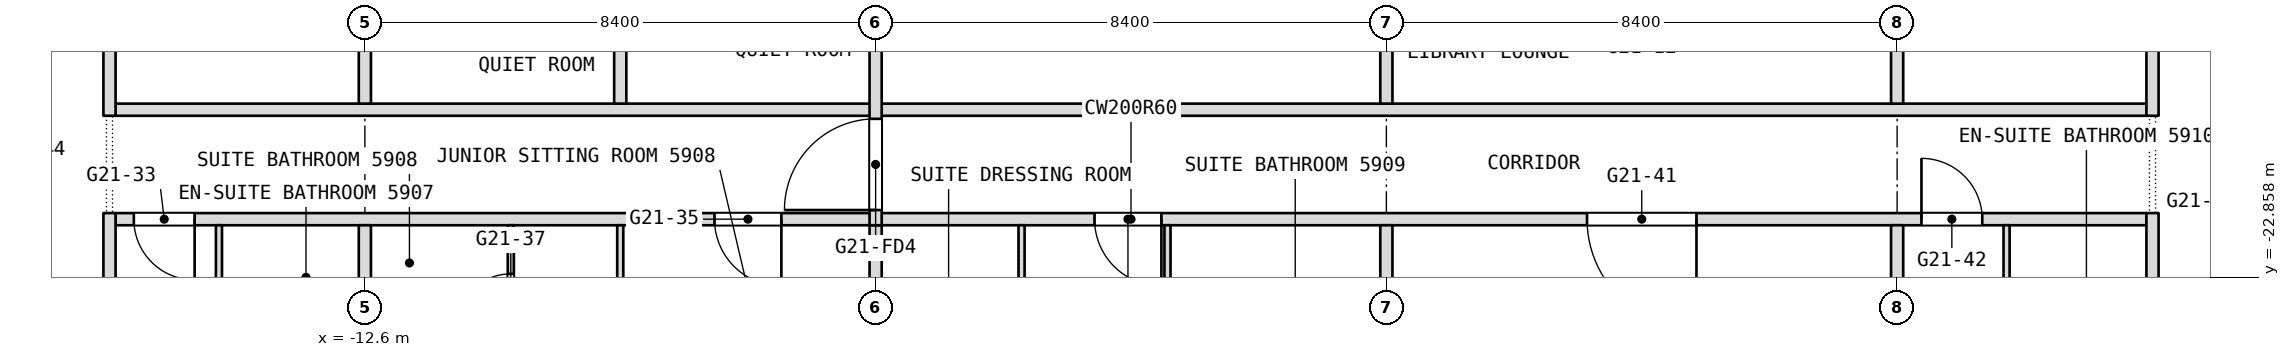
"""IFC4 building model, lengths in metres.
Left out: names, types, materials, properties, quantities, classifications, styles, units other than length and angle.
Written with IfcOpenShell. Run it as: python <this file> out.ifc"""

import sys

from ifc_helpers import new_model, si_unit, direction, frame, frame_2d, origin, place, context, subcontext, project, spatial, rectangle, extrude, element, fill, save


model = new_model("IFC4")
c1 = context("Model", 3, precision=1e-05, world=origin(), true_north=direction((0.0, 1.0)))
c2 = subcontext(c1, "Body", "Model", "MODEL_VIEW")
j1 = project(units=[si_unit("LENGTHUNIT", "METRE"), si_unit("PLANEANGLEUNIT", "RADIAN")], contexts=[c1])
p1 = place(None, origin())
s1 = spatial("IfcSite", under=j1, at=p1, CompositionType="ELEMENT")
p2 = place(p1, origin())
s2 = spatial("IfcBuilding", under=s1, at=p2, CompositionType="ELEMENT")
p3 = place(p2, frame((0.0, 0.0, 248.9)))
s3 = spatial("IfcBuildingStorey", under=s2, at=p3, CompositionType="ELEMENT", Elevation=248.9)
p4 = place(p3, frame((-16.7, -21.9, 0.0), z_axis=(0.0, 0.0, 1.0), x_axis=(1.0, 0.0, 0.0)))
e1 = element("IfcWall", 1, at=p4, inside=s3, PredefinedType="PARTITIONING", context=c2, shape_type="SweptSolid", body=[
    extrude(rectangle(XDim=33.4, YDim=0.2, at=frame_2d((16.7, 0.0))), origin(), (0.0, 0.0, 1.0), 3.3),
])
p5 = place(p4, frame((0.3, 0.0, 0.0)))
e2 = element("IfcOpeningElement", 2, at=p5, cuts=e1, PredefinedType="OPENING", context=c2, shape_type="SweptSolid", body=[
    extrude(rectangle(XDim=1.0, YDim=2.1, at=frame_2d((0.5, 1.05))), frame((0.0, 0.1, 0.0), z_axis=(0.0, -1.0, 0.0), x_axis=(1.0, 0.0, 0.0)), (0.0, 0.0, 1.0), 0.2),
])
p6 = place(p4, frame((9.85, 0.0, 0.0)))
e3 = element("IfcOpeningElement", 3, at=p6, cuts=e1, PredefinedType="OPENING", context=c2, shape_type="SweptSolid", body=[
    extrude(rectangle(XDim=1.1, YDim=2.1, at=frame_2d((0.55, 1.05))), frame((0.0, 0.1, 0.0), z_axis=(0.0, -1.0, 0.0), x_axis=(1.0, 0.0, 0.0)), (0.0, 0.0, 1.0), 0.2),
])
p7 = place(p4, frame((16.1, 0.0, 0.0)))
e4 = element("IfcOpeningElement", 4, at=p7, cuts=e1, PredefinedType="OPENING", context=c2, shape_type="SweptSolid", body=[
    extrude(rectangle(XDim=1.1, YDim=2.1, at=frame_2d((0.55, 1.05))), frame((0.0, 0.1, 0.0), z_axis=(0.0, -1.0, 0.0), x_axis=(1.0, 0.0, 0.0)), (0.0, 0.0, 1.0), 0.2),
])
p8 = place(p4, frame((24.2, 0.0, 0.0)))
e5 = element("IfcOpeningElement", 5, at=p8, cuts=e1, PredefinedType="OPENING", context=c2, shape_type="SweptSolid", body=[
    extrude(rectangle(XDim=1.8, YDim=2.1, at=frame_2d((0.9, 1.05))), frame((0.0, 0.1, 0.0), z_axis=(0.0, -1.0, 0.0), x_axis=(1.0, 0.0, 0.0)), (0.0, 0.0, 1.0), 0.2),
])
p9 = place(p4, frame((29.7, 0.0, 0.0)))
e6 = element("IfcOpeningElement", 6, at=p9, cuts=e1, PredefinedType="OPENING", context=c2, shape_type="SweptSolid", body=[
    extrude(rectangle(XDim=1.0, YDim=2.1, at=frame_2d((0.5, 1.05))), frame((0.0, 0.1, 0.0), z_axis=(0.0, -1.0, 0.0), x_axis=(1.0, 0.0, 0.0)), (0.0, 0.0, 1.0), 0.2),
])
p10 = place(p3, frame((-16.7, -20.1, 0.0), z_axis=(0.0, 0.0, 1.0), x_axis=(1.0, 0.0, 0.0)))
e7 = element("IfcWall", 7, at=p10, inside=s3, PredefinedType="PARTITIONING", context=c2, shape_type="SweptSolid", body=[
    extrude(rectangle(XDim=33.4, YDim=0.2, at=frame_2d((16.7, 0.0))), origin(), (0.0, 0.0, 1.0), 3.3),
])
p11 = place(p3, frame((16.8, -27.229, 0.0), z_axis=(0.0, 0.0, 1.0), x_axis=(0.0, 1.0, 0.0)))
e8 = element("IfcWall", 8, at=p11, inside=s3, PredefinedType="PARTITIONING", context=c2, shape_type="SweptSolid", body=[
    extrude(rectangle(XDim=5.429, YDim=0.2, at=frame_2d((2.714, 0.0))), origin(), (0.0, 0.0, 1.0), 3.3),
])
p12 = place(p3, frame((16.8, -20.2, 0.0), z_axis=(0.0, 0.0, 1.0), x_axis=(0.0, 1.0, 0.0)))
e9 = element("IfcWall", 9, at=p12, inside=s3, PredefinedType="PARTITIONING", context=c2, shape_type="SweptSolid", body=[
    extrude(rectangle(XDim=6.8, YDim=0.2, at=frame_2d((3.4, 0.0))), origin(), (0.0, 0.0, 1.0), 3.3),
])
p13 = place(p3, frame((14.4, -24.95, 0.0), z_axis=(0.0, 0.0, 1.0), x_axis=(0.0, 1.0, 0.0)))
e10 = element("IfcWall", 10, at=p13, inside=s3, PredefinedType="PARTITIONING", context=c2, shape_type="SweptSolid", body=[
    extrude(rectangle(XDim=2.95, YDim=0.1, at=frame_2d((1.475, 0.0))), origin(), (0.0, 0.0, 1.0), 3.3),
])
p14 = place(p3, frame((12.6, -28.343, 0.0), z_axis=(0.0, 0.0, 1.0), x_axis=(0.0, 1.0, 0.0)))
e11 = element("IfcWall", 11, at=p14, inside=s3, PredefinedType="PARTITIONING", context=c2, shape_type="SweptSolid", body=[
    extrude(rectangle(XDim=6.343, YDim=0.2, at=frame_2d((3.171, 0.0))), origin(), (0.0, 0.0, 1.0), 2.486),
])
p15 = place(p3, frame((12.6, -20.0, 0.0), z_axis=(0.0, 0.0, 1.0), x_axis=(0.0, 1.0, 0.0)))
e12 = element("IfcWall", 12, at=p15, inside=s3, PredefinedType="PARTITIONING", context=c2, shape_type="SweptSolid", body=[
    extrude(rectangle(XDim=1.5, YDim=0.2, at=frame_2d((0.75, 0.0))), origin(), (0.0, 0.0, 1.0), 2.486),
])
p16 = place(p3, frame((4.2, -28.9, 0.0), z_axis=(0.0, 0.0, 1.0), x_axis=(0.0, 1.0, 0.0)))
e13 = element("IfcWall", 13, at=p16, inside=s3, PredefinedType="PARTITIONING", context=c2, shape_type="SweptSolid", body=[
    extrude(rectangle(XDim=6.9, YDim=0.2, at=frame_2d((3.45, 0.0))), origin(), (0.0, 0.0, 1.0), 2.486),
])
p17 = place(p3, frame((4.2, -20.0, 0.0), z_axis=(0.0, 0.0, 1.0), x_axis=(0.0, 1.0, 0.0)))
e14 = element("IfcWall", 14, at=p17, inside=s3, PredefinedType="PARTITIONING", context=c2, shape_type="SweptSolid", body=[
    extrude(rectangle(XDim=6.4, YDim=0.2, at=frame_2d((3.2, 0.0))), origin(), (0.0, 0.0, 1.0), 2.486),
])
p18 = place(p3, frame((0.6, -25.55, 0.0), z_axis=(0.0, 0.0, 1.0), x_axis=(0.0, 1.0, 0.0)))
e15 = element("IfcWall", 15, at=p18, inside=s3, PredefinedType="PARTITIONING", context=c2, shape_type="SweptSolid", body=[
    extrude(rectangle(XDim=3.55, YDim=0.1, at=frame_2d((1.775, 0.0))), origin(), (0.0, 0.0, 1.0), 3.3),
])
p19 = place(p3, frame((-1.8, -25.45, 0.0), z_axis=(0.0, 0.0, 1.0), x_axis=(0.0, 1.0, 0.0)))
e16 = element("IfcWall", 16, at=p19, inside=s3, PredefinedType="PARTITIONING", context=c2, shape_type="SweptSolid", body=[
    extrude(rectangle(XDim=3.45, YDim=0.1, at=frame_2d((1.725, 0.0))), origin(), (0.0, 0.0, 1.0), 3.3),
])
p20 = place(p3, frame((-4.2, -28.9, 0.0), z_axis=(0.0, 0.0, 1.0), x_axis=(0.0, 1.0, 0.0)))
e17 = element("IfcWall", 17, at=p20, inside=s3, PredefinedType="PARTITIONING", context=c2, shape_type="SweptSolid", body=[
    extrude(rectangle(XDim=6.9, YDim=0.2, at=frame_2d((3.45, 0.0))), origin(), (0.0, 0.0, 1.0), 2.486),
])
p21 = place(p3, frame((-4.2, -22.0, 0.0), z_axis=(0.0, 0.0, 1.0), x_axis=(0.0, 1.0, 0.0)))
e18 = element("IfcWall", 18, at=p21, inside=s3, PredefinedType="PARTITIONING", context=c2, shape_type="SweptSolid", body=[
    extrude(rectangle(XDim=8.4, YDim=0.2, at=frame_2d((4.2, 0.0))), origin(), (0.0, 0.0, 1.0), 2.486),
])
p22 = place(p21, frame((0.25, 0.0, 0.0)))
e19 = element("IfcOpeningElement", 19, at=p22, cuts=e18, PredefinedType="OPENING", context=c2, shape_type="SweptSolid", body=[
    extrude(rectangle(XDim=1.5, YDim=2.1, at=frame_2d((0.75, 1.05))), frame((0.0, 0.1, 0.0), z_axis=(0.0, -1.0, 0.0), x_axis=(1.0, 0.0, 0.0)), (0.0, 0.0, 1.0), 0.2),
])
p23 = place(p3, frame((-8.4, -28.9, 0.0), z_axis=(0.0, 0.0, 1.0), x_axis=(0.0, 1.0, 0.0)))
e20 = element("IfcWall", 20, at=p23, inside=s3, PredefinedType="PARTITIONING", context=c2, shape_type="SweptSolid", body=[
    extrude(rectangle(XDim=6.9, YDim=0.1, at=frame_2d((3.45, 0.0))), origin(), (0.0, 0.0, 1.0), 3.3),
])
p24 = place(p23, frame((2.53, 0.0, 0.0)))
e21 = element("IfcOpeningElement", 21, at=p24, cuts=e20, PredefinedType="OPENING", context=c2, shape_type="SweptSolid", body=[
    extrude(rectangle(XDim=0.9, YDim=2.1, at=frame_2d((0.45, 1.05))), frame((0.0, 0.05, 0.0), z_axis=(0.0, -1.0, 0.0), x_axis=(1.0, 0.0, 0.0)), (0.0, 0.0, 1.0), 0.1),
])
p25 = place(p3, frame((-8.4, -20.0, 0.0), z_axis=(0.0, 0.0, 1.0), x_axis=(0.0, 1.0, 0.0)))
e22 = element("IfcWall", 22, at=p25, inside=s3, PredefinedType="PARTITIONING", context=c2, shape_type="SweptSolid", body=[
    extrude(rectangle(XDim=1.5, YDim=0.2, at=frame_2d((0.75, 0.0))), origin(), (0.0, 0.0, 1.0), 3.3),
])
p26 = place(p3, frame((-10.2, -24.55, 0.0), z_axis=(0.0, 0.0, 1.0), x_axis=(0.0, 1.0, 0.0)))
e23 = element("IfcWall", 23, at=p26, inside=s3, PredefinedType="PARTITIONING", context=c2, shape_type="SweptSolid", body=[
    extrude(rectangle(XDim=2.55, YDim=0.1, at=frame_2d((1.275, 0.0))), origin(), (0.0, 0.0, 1.0), 3.3),
])
p27 = place(p26, frame((0.85, 0.0, 0.0)))
e24 = element("IfcOpeningElement", 24, at=p27, cuts=e23, PredefinedType="OPENING", context=c2, shape_type="SweptSolid", body=[
    extrude(rectangle(XDim=0.9, YDim=2.1, at=frame_2d((0.45, 1.05))), frame((0.0, 0.05, 0.0), z_axis=(0.0, -1.0, 0.0), x_axis=(1.0, 0.0, 0.0)), (0.0, 0.0, 1.0), 0.1),
])
p28 = place(p3, frame((-12.6, -28.343, 0.0), z_axis=(0.0, 0.0, 1.0), x_axis=(0.0, 1.0, 0.0)))
e25 = element("IfcWall", 25, at=p28, inside=s3, PredefinedType="PARTITIONING", context=c2, shape_type="SweptSolid", body=[
    extrude(rectangle(XDim=6.343, YDim=0.2, at=frame_2d((3.171, 0.0))), origin(), (0.0, 0.0, 1.0), 2.486),
])
p29 = place(p3, frame((-12.6, -20.0, 0.0), z_axis=(0.0, 0.0, 1.0), x_axis=(0.0, 1.0, 0.0)))
e26 = element("IfcWall", 26, at=p29, inside=s3, PredefinedType="PARTITIONING", context=c2, shape_type="SweptSolid", body=[
    extrude(rectangle(XDim=1.5, YDim=0.2, at=frame_2d((0.75, 0.0))), origin(), (0.0, 0.0, 1.0), 2.486),
])
p30 = place(p3, frame((-15.0, -24.75, 0.0), z_axis=(0.0, 0.0, 1.0), x_axis=(0.0, 1.0, 0.0)))
e27 = element("IfcWall", 27, at=p30, inside=s3, PredefinedType="PARTITIONING", context=c2, shape_type="SweptSolid", body=[
    extrude(rectangle(XDim=2.75, YDim=0.1, at=frame_2d((1.375, 0.0))), origin(), (0.0, 0.0, 1.0), 3.3),
])
p31 = place(p3, frame((-16.8, -27.229, 0.0), z_axis=(0.0, 0.0, 1.0), x_axis=(0.0, 1.0, 0.0)))
e28 = element("IfcWall", 28, at=p31, inside=s3, PredefinedType="PARTITIONING", context=c2, shape_type="SweptSolid", body=[
    extrude(rectangle(XDim=5.429, YDim=0.2, at=frame_2d((2.714, 0.0))), origin(), (0.0, 0.0, 1.0), 3.3),
])
p32 = place(p3, frame((-16.8, -20.2, 0.0), z_axis=(0.0, 0.0, 1.0), x_axis=(0.0, 1.0, 0.0)))
e29 = element("IfcWall", 29, at=p32, inside=s3, PredefinedType="PARTITIONING", context=c2, shape_type="SweptSolid", body=[
    extrude(rectangle(XDim=6.8, YDim=0.2, at=frame_2d((3.4, 0.0))), origin(), (0.0, 0.0, 1.0), 3.3),
])
p33 = place(p5, origin())
e30 = element("IfcDoor", 30, at=p33, inside=s3, OperationType="SINGLE_SWING_RIGHT", PredefinedType="DOOR", context=c2, shape_type="SweptSolid", body=[
    extrude(rectangle(XDim=1.0, YDim=2.1, at=frame_2d((0.5, 1.05))), frame((0.0, 0.025, 0.0), z_axis=(0.0, -1.0, 0.0), x_axis=(1.0, 0.0, 0.0)), (0.0, 0.0, 1.0), 0.05),
])
fill(e2, e30)
p34 = place(p6, origin())
e31 = element("IfcDoor", 31, at=p34, inside=s3, OperationType="SINGLE_SWING_LEFT", PredefinedType="DOOR", context=c2, shape_type="SweptSolid", body=[
    extrude(rectangle(XDim=1.1, YDim=2.1, at=frame_2d((0.55, 1.05))), frame((0.0, 0.025, 0.0), z_axis=(0.0, -1.0, 0.0), x_axis=(1.0, 0.0, 0.0)), (0.0, 0.0, 1.0), 0.05),
])
fill(e3, e31)
p35 = place(p7, origin())
e32 = element("IfcDoor", 32, at=p35, inside=s3, OperationType="SINGLE_SWING_LEFT", PredefinedType="DOOR", context=c2, shape_type="SweptSolid", body=[
    extrude(rectangle(XDim=1.1, YDim=2.1, at=frame_2d((0.55, 1.05))), frame((0.0, 0.025, 0.0), z_axis=(0.0, -1.0, 0.0), x_axis=(1.0, 0.0, 0.0)), (0.0, 0.0, 1.0), 0.05),
])
fill(e4, e32)
p36 = place(p8, origin())
e33 = element("IfcDoor", 33, at=p36, inside=s3, OperationType="DOUBLE_DOOR_SINGLE_SWING", PredefinedType="DOOR", context=c2, shape_type="SweptSolid", body=[
    extrude(rectangle(XDim=1.8, YDim=2.1, at=frame_2d((0.9, 1.05))), frame((0.0, 0.025, 0.0), z_axis=(0.0, -1.0, 0.0), x_axis=(1.0, 0.0, 0.0)), (0.0, 0.0, 1.0), 0.05),
])
fill(e5, e33)
p37 = place(p9, origin())
e34 = element("IfcDoor", 34, at=p37, inside=s3, OperationType="SINGLE_SWING_RIGHT", PredefinedType="DOOR", context=c2, shape_type="SweptSolid", body=[
    extrude(rectangle(XDim=1.0, YDim=2.1, at=frame_2d((0.5, 1.05))), frame((0.0, 0.025, 0.0), z_axis=(0.0, -1.0, 0.0), x_axis=(1.0, 0.0, 0.0)), (0.0, 0.0, 1.0), 0.05),
])
fill(e6, e34)
p38 = place(p27, origin())
e35 = element("IfcDoor", 35, at=p38, inside=s3, OperationType="SINGLE_SWING_RIGHT", PredefinedType="DOOR", context=c2, shape_type="SweptSolid", body=[
    extrude(rectangle(XDim=0.9, YDim=2.1, at=frame_2d((0.45, 1.05))), frame((0.0, 0.025, 0.0), z_axis=(0.0, -1.0, 0.0), x_axis=(1.0, 0.0, 0.0)), (0.0, 0.0, 1.0), 0.05),
])
fill(e24, e35)
p39 = place(p22, origin())
e36 = element("IfcDoor", 36, at=p39, inside=s3, OperationType="DOUBLE_DOOR_DOUBLE_SWING", PredefinedType="DOOR", context=c2, shape_type="SweptSolid", body=[
    extrude(rectangle(XDim=1.5, YDim=2.1, at=frame_2d((0.75, 1.05))), frame((0.0, 0.025, 0.0), z_axis=(0.0, -1.0, 0.0), x_axis=(1.0, 0.0, 0.0)), (0.0, 0.0, 1.0), 0.05),
])
fill(e19, e36)
save(model, sys.argv[1])
